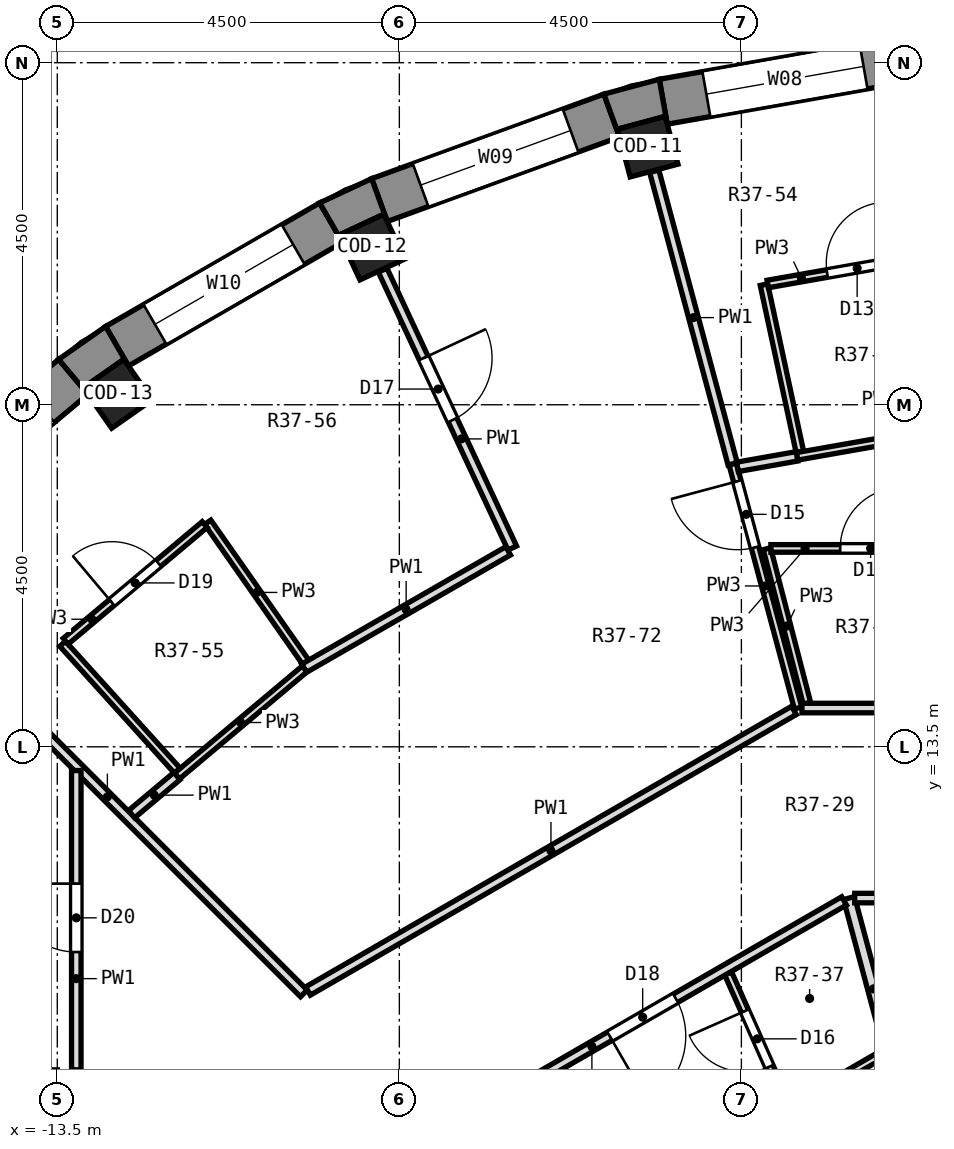
"""IFC4 building model, lengths in metres.
Left out: names, types, materials, properties, quantities, classifications, styles, units other than length and angle.
Written with IfcOpenShell. Run it as: python <this file> out.ifc"""

import sys

from ifc_helpers import new_model, si_unit, direction, frame, frame_2d, origin, origin_2d, place, context, subcontext, project, spatial, polyline, rectangle, outline, extrude, element, fill, save


model = new_model("IFC4")
c1 = context("Model", 3, precision=1e-05, world=origin(), true_north=direction((0.0, 1.0)))
c2 = subcontext(c1, "Body", "Model", "MODEL_VIEW")
j1 = project(units=[si_unit("LENGTHUNIT", "METRE"), si_unit("PLANEANGLEUNIT", "RADIAN")], contexts=[c1])
p1 = place(None, origin())
s1 = spatial("IfcSite", under=j1, at=p1, CompositionType="ELEMENT")
p2 = place(p1, origin())
s2 = spatial("IfcBuilding", under=s1, at=p2, CompositionType="ELEMENT")
p3 = place(p2, frame((0.0, 0.0, 269.3)))
s3 = spatial("IfcBuildingStorey", under=s2, at=p3, CompositionType="ELEMENT", Elevation=269.3)
for number, where, z_axis, x_axis in (
    (1, (-5.733, 21.395, 0.0), (0.0, 0.0, 1.0), (-0.259, 0.966, 0.0)),
    (2, (-9.361, 20.075, 0.0), (0.0, 0.0, 1.0), (-0.423, 0.906, 0.0)),
    (3, (-12.705, 18.144, 0.0), (0.0, 0.0, 1.0), (-0.574, 0.819, 0.0)),
):
    element("IfcColumn", number, at=place(p3, frame(where, z_axis=z_axis, x_axis=x_axis)), inside=s3, PredefinedType="COLUMN", context=c2, shape_type="SweptSolid", body=[
        extrude(rectangle(XDim=0.65, YDim=0.65, at=origin_2d()), origin(), (0.0, 0.0, 1.0), 3.3),
    ])
p4 = place(p3, frame((-2.325, 22.551, 0.0), z_axis=(0.0, 0.0, 1.0), x_axis=(-0.984806225186, -0.173656842178, 0.0)))
e4 = element("IfcWall", 4, at=p4, inside=s3, PredefinedType="SOLIDWALL", context=c2, shape_type="SweptSolid", body=[
    extrude(rectangle(XDim=3.252, YDim=0.6, at=frame_2d((1.626, 0.0))), origin(), (0.0, 0.0, 1.0), 2.9),
])
p5 = place(p4, frame((0.576, 0.0, 0.9)))
e5 = element("IfcOpeningElement", 5, at=p5, cuts=e4, PredefinedType="OPENING", context=c2, shape_type="SweptSolid", body=[
    extrude(rectangle(XDim=2.1, YDim=1.8, at=frame_2d((1.05, 0.9))), frame((0.0, 0.312, 0.0), z_axis=(0.0, -1.0, 0.0), x_axis=(1.0, 0.0, 0.0)), (0.0, 0.0, 1.0), 0.624),
])
p6 = place(p3, frame((-6.206, 21.805, 0.0), z_axis=(0.0, 0.0, 1.0), x_axis=(-0.939679383794, -0.342056509473, 0.0)))
e6 = element("IfcWall", 6, at=p6, inside=s3, PredefinedType="SOLIDWALL", context=c2, shape_type="SweptSolid", body=[
    extrude(rectangle(XDim=3.252, YDim=0.6, at=frame_2d((1.626, 0.0))), origin(), (0.0, 0.0, 1.0), 2.9),
])
p7 = place(p6, frame((0.576, 0.0, 0.9)))
e7 = element("IfcOpeningElement", 7, at=p7, cuts=e6, PredefinedType="OPENING", context=c2, shape_type="SweptSolid", body=[
    extrude(rectangle(XDim=2.1, YDim=1.8, at=frame_2d((1.05, 0.9))), frame((0.0, 0.312, 0.0), z_axis=(0.0, -1.0, 0.0), x_axis=(1.0, 0.0, 0.0)), (0.0, 0.0, 1.0), 0.624),
])
p8 = place(p3, frame((-9.898, 20.396, 0.0), z_axis=(0.0, 0.0, 1.0), x_axis=(-0.866016800201, -0.500014901547, 0.0)))
e8 = element("IfcWall", 8, at=p8, inside=s3, PredefinedType="SOLIDWALL", context=c2, shape_type="SweptSolid", body=[
    extrude(rectangle(XDim=3.252, YDim=0.6, at=frame_2d((1.626, 0.0))), origin(), (0.0, 0.0, 1.0), 2.9),
])
p9 = place(p8, frame((0.576, 0.0, 0.9)))
e9 = element("IfcOpeningElement", 9, at=p9, cuts=e8, PredefinedType="OPENING", context=c2, shape_type="SweptSolid", body=[
    extrude(rectangle(XDim=2.1, YDim=1.8, at=frame_2d((1.05, 0.9))), frame((0.0, 0.312, 0.0), z_axis=(0.0, -1.0, 0.0), x_axis=(1.0, 0.0, 0.0)), (0.0, 0.0, 1.0), 0.624),
])
p10 = place(p3, frame((-13.29, 18.367, 0.0), z_axis=(0.0, 0.0, 1.0), x_axis=(-0.766056773982, -0.64277291405, 0.0)))
e10 = element("IfcWall", 10, at=p10, inside=s3, PredefinedType="SOLIDWALL", context=c2, shape_type="SweptSolid", body=[
    extrude(rectangle(XDim=3.252, YDim=0.6, at=frame_2d((1.626, 0.0))), origin(), (0.0, 0.0, 1.0), 2.9),
])
p11 = place(p10, frame((0.576, 0.0, 0.9)))
e11 = element("IfcOpeningElement", 11, at=p11, cuts=e10, PredefinedType="OPENING", context=c2, shape_type="SweptSolid", body=[
    extrude(rectangle(XDim=2.1, YDim=1.8, at=frame_2d((1.05, 0.9))), frame((0.0, 0.312, 0.0), z_axis=(0.0, -1.0, 0.0), x_axis=(1.0, 0.0, 0.0)), (0.0, 0.0, 1.0), 0.624),
])
p12 = place(p3, origin())
e12 = element("IfcWall", 12, at=p12, inside=s3, PredefinedType="SOLIDWALL", context=c2, shape_type="SweptSolid", body=[
    extrude(outline(polyline([(-6.309, 22.087), (-6.104, 21.523), (-6.131, 21.625), (-5.503, 21.793), (-5.476, 21.691), (-5.58, 22.282), (-6.309, 22.087)])), origin(), (0.0, 0.0, 1.0), 2.9),
])
p13 = place(p3, origin())
e13 = element("IfcWall", 13, at=p13, inside=s3, PredefinedType="SOLIDWALL", context=c2, shape_type="SweptSolid", body=[
    extrude(outline(polyline([(-9.364, 20.975), (-10.048, 20.656), (-9.748, 20.136), (-9.793, 20.232), (-9.204, 20.507), (-9.159, 20.411), (-9.364, 20.975)])), origin(), (0.0, 0.0, 1.0), 2.9),
])
p14 = place(p3, origin())
e14 = element("IfcWall", 14, at=p14, inside=s3, PredefinedType="SOLIDWALL", context=c2, shape_type="SweptSolid", body=[
    extrude(outline(polyline([(-12.864, 19.03), (-13.482, 18.597), (-13.097, 18.137), (-13.157, 18.224), (-12.625, 18.597), (-12.564, 18.51), (-12.864, 19.03)])), origin(), (0.0, 0.0, 1.0), 2.9),
])
p15 = place(p3, frame((-4.203, 19.58, 0.0), z_axis=(0.0, 0.0, 1.0), x_axis=(0.209840128727, -0.977735710904, 0.0)))
e15 = element("IfcWall", 15, at=p15, inside=s3, PredefinedType="PARTITIONING", context=c2, shape_type="SweptSolid", body=[
    extrude(rectangle(XDim=2.251, YDim=0.1, at=frame_2d((1.125, 0.0))), origin(), (0.0, 0.0, 1.0), 2.9),
])
p16 = place(p3, frame((-4.164, 16.106, 0.0), z_axis=(0.0, 0.0, 1.0), x_axis=(0.250341539679, -0.968157587127, 0.0)))
e16 = element("IfcWall", 16, at=p16, inside=s3, PredefinedType="PARTITIONING", context=c2, shape_type="SweptSolid", body=[
    extrude(rectangle(XDim=2.103, YDim=0.1, at=frame_2d((1.051, 0.0))), origin(), (0.0, 0.0, 1.0), 2.9),
])
p17 = place(p3, frame((-4.615, 17.222, 0.0), z_axis=(0.0, 0.0, 1.0), x_axis=(0.258841272413, -0.965919870225, 0.0)))
e17 = element("IfcWall", 17, at=p17, inside=s3, PredefinedType="PARTITIONING", context=c2, shape_type="SweptSolid", body=[
    extrude(rectangle(XDim=3.326, YDim=0.1, at=frame_2d((1.663, 0.0))), origin(), (0.0, 0.0, 1.0), 2.9),
])
p18 = place(p17, frame((0.237, 0.0, 0.0)))
e18 = element("IfcOpeningElement", 18, at=p18, cuts=e17, PredefinedType="OPENING", context=c2, shape_type="SweptSolid", body=[
    extrude(rectangle(XDim=0.9, YDim=2.1, at=frame_2d((0.45, 1.05))), frame((0.0, 0.062, 0.0), z_axis=(0.0, -1.0, 0.0), x_axis=(1.0, 0.0, 0.0)), (0.0, 0.0, 1.0), 0.124),
])
p19 = place(p3, frame((-5.646, 21.072, 0.0), z_axis=(0.0, 0.0, 1.0), x_axis=(0.258718732156, -0.965952699479, 0.0)))
e19 = element("IfcWall", 19, at=p19, inside=s3, PredefinedType="PARTITIONING", context=c2, shape_type="SweptSolid", body=[
    extrude(rectangle(XDim=3.985, YDim=0.125, at=frame_2d((1.993, 0.0))), origin(), (0.0, 0.0, 1.0), 2.9),
])
p20 = place(p3, frame((-3.084, 11.51, 0.0), z_axis=(0.0, 0.0, 1.0), x_axis=(0.258872567774, -0.965911483343, 0.0)))
e20 = element("IfcWall", 20, at=p20, inside=s3, PredefinedType="PARTITIONING", context=c2, shape_type="SweptSolid", body=[
    extrude(rectangle(XDim=2.474, YDim=0.15, at=frame_2d((1.237, 0.0))), origin(), (0.0, 0.0, 1.0), 2.9),
])
p21 = place(p3, frame((-4.675, 10.52, 0.0), z_axis=(0.0, 0.0, 1.0), x_axis=(0.405743130594, -0.913987150881, 0.0)))
e21 = element("IfcWall", 21, at=p21, inside=s3, PredefinedType="PARTITIONING", context=c2, shape_type="SweptSolid", body=[
    extrude(rectangle(XDim=1.948, YDim=0.1, at=frame_2d((0.974, 0.0))), origin(), (0.0, 0.0, 1.0), 2.9),
])
p22 = place(p21, frame((0.543, 0.0, 0.0)))
e22 = element("IfcOpeningElement", 22, at=p22, cuts=e21, PredefinedType="OPENING", context=c2, shape_type="SweptSolid", body=[
    extrude(rectangle(XDim=0.8, YDim=2.1, at=frame_2d((0.4, 1.05))), frame((0.0, 0.062, 0.0), z_axis=(0.0, -1.0, 0.0), x_axis=(1.0, 0.0, 0.0)), (0.0, 0.0, 1.0), 0.124),
])
p23 = place(p3, frame((-9.219, 19.771, 0.0), z_axis=(0.0, 0.0, 1.0), x_axis=(0.422689943865, -0.906274357662, 0.0)))
e23 = element("IfcWall", 23, at=p23, inside=s3, PredefinedType="PARTITIONING", context=c2, shape_type="SweptSolid", body=[
    extrude(rectangle(XDim=4.033, YDim=0.125, at=frame_2d((2.017, 0.0))), origin(), (0.0, 0.0, 1.0), 2.9),
])
p24 = place(p23, frame((1.276, 0.0, 0.0)))
e24 = element("IfcOpeningElement", 24, at=p24, cuts=e23, PredefinedType="OPENING", context=c2, shape_type="SweptSolid", body=[
    extrude(rectangle(XDim=0.9, YDim=2.1, at=frame_2d((0.45, 1.05))), frame((0.0, 0.074, 0.0), z_axis=(0.0, -1.0, 0.0), x_axis=(1.0, 0.0, 0.0)), (0.0, 0.0, 1.0), 0.149),
])
p25 = place(p3, frame((-11.521, 16.454, 0.0), z_axis=(0.0, 0.0, 1.0), x_axis=(0.573476881905, -0.819221744047, 0.0)))
e25 = element("IfcWall", 25, at=p25, inside=s3, PredefinedType="PARTITIONING", context=c2, shape_type="SweptSolid", body=[
    extrude(rectangle(XDim=2.254, YDim=0.1, at=frame_2d((1.127, 0.0))), origin(), (0.0, 0.0, 1.0), 2.9),
])
p26 = place(p3, frame((-13.429, 14.855, 0.0), z_axis=(0.0, 0.0, 1.0), x_axis=(0.670353689302, -0.742041731468, 0.0)))
e26 = element("IfcWall", 26, at=p26, inside=s3, PredefinedType="PARTITIONING", context=c2, shape_type="SweptSolid", body=[
    extrude(rectangle(XDim=2.251, YDim=0.1, at=frame_2d((1.125, 0.0))), origin(), (0.0, 0.0, 1.0), 2.9),
])
p27 = place(p3, frame((-15.426, 15.426, 0.0), z_axis=(0.0, 0.0, 1.0), x_axis=(0.707106781187, -0.707106781187, 0.0)))
e27 = element("IfcWall", 27, at=p27, inside=s3, PredefinedType="PARTITIONING", context=c2, shape_type="SweptSolid", body=[
    extrude(rectangle(XDim=7.311, YDim=0.125, at=frame_2d((3.655, 0.0))), origin(), (0.0, 0.0, 1.0), 2.9),
])
p28 = place(p3, frame((-3.009, 11.51, 0.0), z_axis=(0.0, 0.0, 1.0), x_axis=(1.0, 0.0, 0.0)))
e28 = element("IfcWall", 28, at=p28, inside=s3, PredefinedType="PARTITIONING", context=c2, shape_type="SweptSolid", body=[
    extrude(rectangle(XDim=6.031, YDim=0.125, at=frame_2d((3.015, 0.0))), origin(), (0.0, 0.0, 1.0), 2.9),
])
p29 = place(p28, frame((2.56, 0.0, 0.0)))
e29 = element("IfcOpeningElement", 29, at=p29, cuts=e28, PredefinedType="OPENING", context=c2, shape_type="SweptSolid", body=[
    extrude(rectangle(XDim=1.0, YDim=2.1, at=frame_2d((0.5, 1.05))), frame((0.0, 0.074, 0.0), z_axis=(0.0, -1.0, 0.0), x_axis=(1.0, 0.0, 0.0)), (0.0, 0.0, 1.0), 0.149),
])
p30 = place(p3, frame((-3.703, 14.01, 0.0), z_axis=(0.0, 0.0, 1.0), x_axis=(1.0, 0.0, 0.0)))
e30 = element("IfcWall", 30, at=p30, inside=s3, PredefinedType="PARTITIONING", context=c2, shape_type="SweptSolid", body=[
    extrude(rectangle(XDim=7.393, YDim=0.125, at=frame_2d((3.697, 0.0))), origin(), (0.0, 0.0, 1.0), 2.9),
])
p31 = place(p30, frame((2.466, 0.0, 0.0)))
e31 = element("IfcOpeningElement", 31, at=p31, cuts=e30, PredefinedType="OPENING", context=c2, shape_type="SweptSolid", body=[
    extrude(rectangle(XDim=1.0, YDim=2.1, at=frame_2d((0.5, 1.05))), frame((0.0, 0.074, 0.0), z_axis=(0.0, -1.0, 0.0), x_axis=(1.0, 0.0, 0.0)), (0.0, 0.0, 1.0), 0.149),
])
p32 = place(p3, frame((-4.112, 16.11, 0.0), z_axis=(0.0, 0.0, 1.0), x_axis=(1.0, 0.0, 0.0)))
e32 = element("IfcWall", 32, at=p32, inside=s3, PredefinedType="PARTITIONING", context=c2, shape_type="SweptSolid", body=[
    extrude(rectangle(XDim=2.224, YDim=0.1, at=frame_2d((1.112, 0.0))), origin(), (0.0, 0.0, 1.0), 2.9),
])
p33 = place(p32, frame((0.912, 0.0, 0.0)))
e33 = element("IfcOpeningElement", 33, at=p33, cuts=e32, PredefinedType="OPENING", context=c2, shape_type="SweptSolid", body=[
    extrude(rectangle(XDim=0.8, YDim=2.1, at=frame_2d((0.4, 1.05))), frame((0.0, 0.062, 0.0), z_axis=(0.0, -1.0, 0.0), x_axis=(1.0, 0.0, 0.0)), (0.0, 0.0, 1.0), 0.124),
])
p34 = place(p3, frame((-3.769, 17.321, 0.0), z_axis=(0.0, 0.0, 1.0), x_axis=(0.984849681909, 0.173410218971, 0.0)))
e34 = element("IfcWall", 34, at=p34, inside=s3, PredefinedType="PARTITIONING", context=c2, shape_type="SweptSolid", body=[
    extrude(rectangle(XDim=2.191, YDim=0.1, at=frame_2d((1.095, 0.0))), origin(), (0.0, 0.0, 1.0), 2.9),
])
p35 = place(p3, frame((-4.552, 17.183, 0.0), z_axis=(0.0, 0.0, 1.0), x_axis=(0.984709236114, 0.174205970944, 0.0)))
e35 = element("IfcWall", 35, at=p35, inside=s3, PredefinedType="PARTITIONING", context=c2, shape_type="SweptSolid", body=[
    extrude(rectangle(XDim=0.795, YDim=0.125, at=frame_2d((0.397, 0.0))), origin(), (0.0, 0.0, 1.0), 2.9),
])
p36 = place(p3, frame((-4.154, 19.589, 0.0), z_axis=(0.0, 0.0, 1.0), x_axis=(0.984824883782, 0.173550996204, 0.0)))
e36 = element("IfcWall", 36, at=p36, inside=s3, PredefinedType="PARTITIONING", context=c2, shape_type="SweptSolid", body=[
    extrude(rectangle(XDim=2.377, YDim=0.1, at=frame_2d((1.189, 0.0))), origin(), (0.0, 0.0, 1.0), 2.9),
])
p37 = place(p36, frame((0.795, 0.0, 0.0)))
e37 = element("IfcOpeningElement", 37, at=p37, cuts=e36, PredefinedType="OPENING", context=c2, shape_type="SweptSolid", body=[
    extrude(rectangle(XDim=0.8, YDim=2.1, at=frame_2d((0.4, 1.05))), frame((0.0, 0.062, 0.0), z_axis=(0.0, -1.0, 0.0), x_axis=(1.0, 0.0, 0.0)), (0.0, 0.0, 1.0), 0.124),
])
p38 = place(p3, frame((-10.253, 14.533, 0.0), z_axis=(0.0, 0.0, 1.0), x_axis=(0.86679387043, 0.498666608252, 0.0)))
e38 = element("IfcWall", 38, at=p38, inside=s3, PredefinedType="PARTITIONING", context=c2, shape_type="SweptSolid", body=[
    extrude(rectangle(XDim=3.097, YDim=0.125, at=frame_2d((1.549, 0.0))), origin(), (0.0, 0.0, 1.0), 2.9),
])
p39 = place(p3, frame((-3.841, 8.764, 0.0), z_axis=(0.0, 0.0, 1.0), x_axis=(0.866093804534, 0.499881507708, 0.0)))
e39 = element("IfcWall", 39, at=p39, inside=s3, PredefinedType="PARTITIONING", context=c2, shape_type="SweptSolid", body=[
    extrude(rectangle(XDim=1.417, YDim=0.1, at=frame_2d((0.708, 0.0))), origin(), (0.0, 0.0, 1.0), 2.9),
])
p40 = place(p3, frame((-8.372, 8.457, 0.0), z_axis=(0.0, 0.0, 1.0), x_axis=(0.866047390407, 0.499961916119, 0.0)))
e40 = element("IfcWall", 40, at=p40, inside=s3, PredefinedType="PARTITIONING", context=c2, shape_type="SweptSolid", body=[
    extrude(rectangle(XDim=6.031, YDim=0.125, at=frame_2d((3.015, 0.0))), origin(), (0.0, 0.0, 1.0), 2.9),
])
p41 = place(p40, frame((2.471, 0.0, 0.0)))
e41 = element("IfcOpeningElement", 41, at=p41, cuts=e40, PredefinedType="OPENING", context=c2, shape_type="SweptSolid", body=[
    extrude(rectangle(XDim=1.0, YDim=2.1, at=frame_2d((0.5, 1.05))), frame((0.0, 0.074, 0.0), z_axis=(0.0, -1.0, 0.0), x_axis=(1.0, 0.0, 0.0)), (0.0, 0.0, 1.0), 0.149),
])
p42 = place(p3, frame((-10.202, 10.287, 0.0), z_axis=(0.0, 0.0, 1.0), x_axis=(0.866028642731, 0.499994389938, 0.0)))
e42 = element("IfcWall", 42, at=p42, inside=s3, PredefinedType="PARTITIONING", context=c2, shape_type="SweptSolid", body=[
    extrude(rectangle(XDim=7.383, YDim=0.125, at=frame_2d((3.691, 0.0))), origin(), (0.0, 0.0, 1.0), 2.9),
])
p43 = place(p3, frame((-11.926, 13.115, 0.0), z_axis=(0.0, 0.0, 1.0), x_axis=(0.766119067307, 0.642698665557, 0.0)))
e43 = element("IfcWall", 43, at=p43, inside=s3, PredefinedType="PARTITIONING", context=c2, shape_type="SweptSolid", body=[
    extrude(rectangle(XDim=2.194, YDim=0.1, at=frame_2d((1.097, 0.0))), origin(), (0.0, 0.0, 1.0), 2.9),
])
p44 = place(p3, frame((-12.522, 12.614, 0.0), z_axis=(0.0, 0.0, 1.0), x_axis=(0.765618354165, 0.643295061201, 0.0)))
e44 = element("IfcWall", 44, at=p44, inside=s3, PredefinedType="PARTITIONING", context=c2, shape_type="SweptSolid", body=[
    extrude(rectangle(XDim=0.778, YDim=0.125, at=frame_2d((0.389, 0.0))), origin(), (0.0, 0.0, 1.0), 2.9),
])
p45 = place(p3, frame((-13.39, 14.889, 0.0), z_axis=(0.0, 0.0, 1.0), x_axis=(0.765894211942, 0.642966605753, 0.0)))
e45 = element("IfcWall", 45, at=p45, inside=s3, PredefinedType="PARTITIONING", context=c2, shape_type="SweptSolid", body=[
    extrude(rectangle(XDim=2.387, YDim=0.1, at=frame_2d((1.194, 0.0))), origin(), (0.0, 0.0, 1.0), 2.9),
])
p46 = place(p45, frame((0.793, 0.0, 0.0)))
e46 = element("IfcOpeningElement", 46, at=p46, cuts=e45, PredefinedType="OPENING", context=c2, shape_type="SweptSolid", body=[
    extrude(rectangle(XDim=0.8, YDim=2.1, at=frame_2d((0.4, 1.05))), frame((0.0, 0.062, 0.0), z_axis=(0.0, -1.0, 0.0), x_axis=(1.0, 0.0, 0.0)), (0.0, 0.0, 1.0), 0.124),
])
p47 = place(p3, frame((-13.25, 9.25, 0.0), z_axis=(0.0, 0.0, 1.0), x_axis=(0.0, 1.0, 0.0)))
e47 = element("IfcWall", 47, at=p47, inside=s3, PredefinedType="PARTITIONING", context=c2, shape_type="SweptSolid", body=[
    extrude(rectangle(XDim=3.938, YDim=0.125, at=frame_2d((1.969, 0.0))), origin(), (0.0, 0.0, 1.0), 2.9),
])
p48 = place(p47, frame((1.55, 0.0, 0.0)))
e48 = element("IfcOpeningElement", 48, at=p48, cuts=e47, PredefinedType="OPENING", context=c2, shape_type="SweptSolid", body=[
    extrude(rectangle(XDim=0.9, YDim=2.1, at=frame_2d((0.45, 1.05))), frame((0.0, 0.074, 0.0), z_axis=(0.0, -1.0, 0.0), x_axis=(1.0, 0.0, 0.0)), (0.0, 0.0, 1.0), 0.149),
])
p49 = place(p5, origin())
e49 = element("IfcWindow", 49, at=p49, inside=s3, PartitioningType="SINGLE_PANEL", PredefinedType="WINDOW", context=c2, shape_type="SweptSolid", body=[
    extrude(rectangle(XDim=2.1, YDim=1.8, at=frame_2d((1.05, 0.9))), frame((0.0, 0.18, 0.0), z_axis=(0.0, -1.0, 0.0), x_axis=(1.0, 0.0, 0.0)), (0.0, 0.0, 1.0), 0.06),
])
fill(e5, e49)
p50 = place(p7, origin())
e50 = element("IfcWindow", 50, at=p50, inside=s3, PartitioningType="SINGLE_PANEL", PredefinedType="WINDOW", context=c2, shape_type="SweptSolid", body=[
    extrude(rectangle(XDim=2.1, YDim=1.8, at=frame_2d((1.05, 0.9))), frame((0.0, 0.18, 0.0), z_axis=(0.0, -1.0, 0.0), x_axis=(1.0, 0.0, 0.0)), (0.0, 0.0, 1.0), 0.06),
])
fill(e7, e50)
p51 = place(p9, origin())
e51 = element("IfcWindow", 51, at=p51, inside=s3, PartitioningType="SINGLE_PANEL", PredefinedType="WINDOW", context=c2, shape_type="SweptSolid", body=[
    extrude(rectangle(XDim=2.1, YDim=1.8, at=frame_2d((1.05, 0.9))), frame((0.0, 0.18, 0.0), z_axis=(0.0, -1.0, 0.0), x_axis=(1.0, 0.0, 0.0)), (0.0, 0.0, 1.0), 0.06),
])
fill(e9, e51)
p52 = place(p37, origin())
e52 = element("IfcDoor", 52, at=p52, inside=s3, OperationType="SINGLE_SWING_RIGHT", PredefinedType="DOOR", context=c2, shape_type="SweptSolid", body=[
    extrude(rectangle(XDim=0.8, YDim=2.1, at=frame_2d((0.4, 1.05))), frame((0.0, 0.025, 0.0), z_axis=(0.0, -1.0, 0.0), x_axis=(1.0, 0.0, 0.0)), (0.0, 0.0, 1.0), 0.05),
])
fill(e37, e52)
p53 = place(p33, origin())
e53 = element("IfcDoor", 53, at=p53, inside=s3, OperationType="SINGLE_SWING_RIGHT", PredefinedType="DOOR", context=c2, shape_type="SweptSolid", body=[
    extrude(rectangle(XDim=0.8, YDim=2.1, at=frame_2d((0.4, 1.05))), frame((0.0, 0.025, 0.0), z_axis=(0.0, -1.0, 0.0), x_axis=(1.0, 0.0, 0.0)), (0.0, 0.0, 1.0), 0.05),
])
fill(e33, e53)
p54 = place(p18, frame((0.9, 0.0, 0.0), z_axis=(0.0, 0.0, 1.0), x_axis=(-1.0, 0.0, 0.0)))
e54 = element("IfcDoor", 54, at=p54, inside=s3, OperationType="SINGLE_SWING_RIGHT", PredefinedType="DOOR", context=c2, shape_type="SweptSolid", body=[
    extrude(rectangle(XDim=0.9, YDim=2.1, at=frame_2d((0.45, 1.05))), frame((0.0, 0.025, 0.0), z_axis=(0.0, -1.0, 0.0), x_axis=(1.0, 0.0, 0.0)), (0.0, 0.0, 1.0), 0.05),
])
fill(e18, e54)
p55 = place(p22, frame((0.8, 0.0, 0.0), z_axis=(0.0, 0.0, 1.0), x_axis=(-1.0, 0.0, 0.0)))
e55 = element("IfcDoor", 55, at=p55, inside=s3, OperationType="SINGLE_SWING_RIGHT", PredefinedType="DOOR", context=c2, shape_type="SweptSolid", body=[
    extrude(rectangle(XDim=0.8, YDim=2.1, at=frame_2d((0.4, 1.05))), frame((0.0, 0.025, 0.0), z_axis=(0.0, -1.0, 0.0), x_axis=(1.0, 0.0, 0.0)), (0.0, 0.0, 1.0), 0.05),
])
fill(e22, e55)
p56 = place(p24, origin())
e56 = element("IfcDoor", 56, at=p56, inside=s3, OperationType="SINGLE_SWING_LEFT", PredefinedType="DOOR", context=c2, shape_type="SweptSolid", body=[
    extrude(rectangle(XDim=0.9, YDim=2.1, at=frame_2d((0.45, 1.05))), frame((0.0, 0.025, 0.0), z_axis=(0.0, -1.0, 0.0), x_axis=(1.0, 0.0, 0.0)), (0.0, 0.0, 1.0), 0.05),
])
fill(e24, e56)
p57 = place(p41, frame((1.0, 0.0, 0.0), z_axis=(0.0, 0.0, 1.0), x_axis=(-1.0, 0.0, 0.0)))
e57 = element("IfcDoor", 57, at=p57, inside=s3, OperationType="SINGLE_SWING_RIGHT", PredefinedType="DOOR", context=c2, shape_type="SweptSolid", body=[
    extrude(rectangle(XDim=1.0, YDim=2.1, at=frame_2d((0.5, 1.05))), frame((0.0, 0.025, 0.0), z_axis=(0.0, -1.0, 0.0), x_axis=(1.0, 0.0, 0.0)), (0.0, 0.0, 1.0), 0.05),
])
fill(e41, e57)
p58 = place(p46, origin())
e58 = element("IfcDoor", 58, at=p58, inside=s3, OperationType="SINGLE_SWING_LEFT", PredefinedType="DOOR", context=c2, shape_type="SweptSolid", body=[
    extrude(rectangle(XDim=0.8, YDim=2.1, at=frame_2d((0.4, 1.05))), frame((0.0, 0.025, 0.0), z_axis=(0.0, -1.0, 0.0), x_axis=(1.0, 0.0, 0.0)), (0.0, 0.0, 1.0), 0.05),
])
fill(e46, e58)
p59 = place(p48, origin())
e59 = element("IfcDoor", 59, at=p59, inside=s3, OperationType="SINGLE_SWING_RIGHT", PredefinedType="DOOR", context=c2, shape_type="SweptSolid", body=[
    extrude(rectangle(XDim=0.9, YDim=2.1, at=frame_2d((0.45, 1.05))), frame((0.0, 0.025, 0.0), z_axis=(0.0, -1.0, 0.0), x_axis=(1.0, 0.0, 0.0)), (0.0, 0.0, 1.0), 0.05),
])
fill(e48, e59)
save(model, sys.argv[1])
